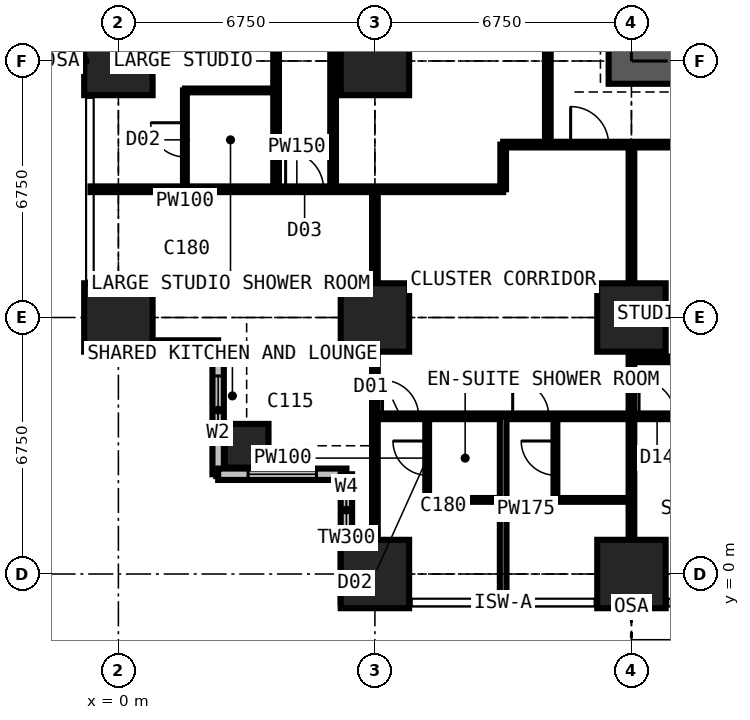
"""IFC4 building model, lengths in metres.
Left out: names, types, materials, properties, quantities, classifications, styles, units other than length and angle.
Written with IfcOpenShell. Run it as: python <this file> out.ifc"""

import sys

from ifc_helpers import new_model, si_unit, direction, frame, frame_2d, origin, origin_2d, place, context, subcontext, project, spatial, rectangle, extrude, element, fill, save


model = new_model("IFC4")
c1 = context("Model", 3, precision=1e-05, world=origin(), true_north=direction((0.0, 1.0)))
c2 = subcontext(c1, "Body", "Model", "MODEL_VIEW")
j1 = project(units=[si_unit("LENGTHUNIT", "METRE"), si_unit("PLANEANGLEUNIT", "RADIAN")], contexts=[c1])
p1 = place(None, origin())
s1 = spatial("IfcSite", under=j1, at=p1, CompositionType="ELEMENT")
p2 = place(p1, origin())
s2 = spatial("IfcBuilding", under=s1, at=p2, CompositionType="ELEMENT")
p3 = place(p2, frame((0.0, 0.0, 50.4)))
s3 = spatial("IfcBuildingStorey", under=s2, at=p3, CompositionType="ELEMENT", Elevation=50.4)
for number, where, z_axis, x_axis in (
    (1, (0.0, 6.75, 0.0), (0.0, 0.0, 1.0), (1.0, 0.0, 0.0)),
    (2, (0.0, 13.5, 0.0), (0.0, 0.0, 1.0), (1.0, 0.0, 0.0)),
):
    element("IfcColumn", number, at=place(p3, frame(where, z_axis=z_axis, x_axis=x_axis)), inside=s3, PredefinedType="COLUMN", context=c2, shape_type="SweptSolid", body=[
        extrude(rectangle(XDim=1.8, YDim=1.8, at=origin_2d()), origin(), (0.0, 0.0, 1.0), 3.6),
    ])
p4 = place(p3, frame((3.375, 3.375, 0.0), z_axis=(0.0, 0.0, 1.0), x_axis=(1.0, 0.0, 0.0)))
e3 = element("IfcColumn", 3, at=p4, inside=s3, PredefinedType="COLUMN", context=c2, shape_type="SweptSolid", body=[
    extrude(rectangle(XDim=1.15, YDim=1.15, at=origin_2d()), origin(), (0.0, 0.0, 1.0), 3.6),
])
for number, where, z_axis, x_axis in (
    (4, (6.75, 0.0, 0.0), (0.0, 0.0, 1.0), (1.0, 0.0, 0.0)),
    (5, (6.75, 6.75, 0.0), (0.0, 0.0, 1.0), (1.0, 0.0, 0.0)),
    (6, (6.75, 13.5, 0.0), (0.0, 0.0, 1.0), (1.0, 0.0, 0.0)),
    (7, (13.5, 0.0, 0.0), (0.0, 0.0, 1.0), (1.0, 0.0, 0.0)),
    (8, (13.5, 6.75, 0.0), (0.0, 0.0, 1.0), (1.0, 0.0, 0.0)),
):
    element("IfcColumn", number, at=place(p3, frame(where, z_axis=z_axis, x_axis=x_axis)), inside=s3, PredefinedType="COLUMN", context=c2, shape_type="SweptSolid", body=[
        extrude(rectangle(XDim=1.8, YDim=1.8, at=origin_2d()), origin(), (0.0, 0.0, 1.0), 3.6),
    ])
p5 = place(p3, frame((12.9, 13.5, 0.0), z_axis=(0.0, 0.0, 1.0), x_axis=(1.0, 0.0, 0.0)))
e9 = element("IfcWall", 9, at=p5, inside=s3, PredefinedType="SHEAR", context=c2, shape_type="SweptSolid", body=[
    extrude(rectangle(XDim=14.7, YDim=1.2, at=frame_2d((7.35, 0.0))), origin(), (0.0, 0.0, 1.0), 3.6),
])
p6 = place(p3, frame((-0.75, 6.0, 0.0), z_axis=(0.0, 0.0, 1.0), x_axis=(1.0, 0.0, 0.0)))
e10 = element("IfcWall", 10, at=p6, inside=s3, PredefinedType="SOLIDWALL", context=c2, shape_type="SweptSolid", body=[
    extrude(rectangle(XDim=3.375, YDim=0.3, at=frame_2d((1.688, 0.0))), origin(), (0.0, 0.0, 1.0), 3.375),
])
p7 = place(p6, frame((1.833, 0.0, 0.9)))
e11 = element("IfcOpeningElement", 11, at=p7, cuts=e10, PredefinedType="OPENING", context=c2, shape_type="SweptSolid", body=[
    extrude(rectangle(XDim=1.2, YDim=1.8, at=frame_2d((0.6, 0.9))), frame((0.0, 0.16, 0.0), z_axis=(0.0, -1.0, 0.0), x_axis=(1.0, 0.0, 0.0)), (0.0, 0.0, 1.0), 0.32),
])
p8 = place(p3, frame((2.625, 6.0, 0.0), z_axis=(0.0, 0.0, 1.0), x_axis=(0.0, -1.0, 0.0)))
e12 = element("IfcWall", 12, at=p8, inside=s3, PredefinedType="SOLIDWALL", context=c2, shape_type="SweptSolid", body=[
    extrude(rectangle(XDim=3.375, YDim=0.3, at=frame_2d((1.688, 0.0))), origin(), (0.0, 0.0, 1.0), 3.375),
])
p9 = place(p8, frame((0.788, 0.0, 0.6)))
e13 = element("IfcOpeningElement", 13, at=p9, cuts=e12, PredefinedType="OPENING", context=c2, shape_type="SweptSolid", body=[
    extrude(rectangle(XDim=1.8, YDim=2.1, at=frame_2d((0.9, 1.05))), frame((0.0, 0.16, 0.0), z_axis=(0.0, -1.0, 0.0), x_axis=(1.0, 0.0, 0.0)), (0.0, 0.0, 1.0), 0.32),
])
p10 = place(p3, frame((2.625, 2.625, 0.0), z_axis=(0.0, 0.0, 1.0), x_axis=(1.0, 0.0, 0.0)))
e14 = element("IfcWall", 14, at=p10, inside=s3, PredefinedType="SOLIDWALL", context=c2, shape_type="SweptSolid", body=[
    extrude(rectangle(XDim=3.375, YDim=0.3, at=frame_2d((1.688, 0.0))), origin(), (0.0, 0.0, 1.0), 3.375),
])
p11 = place(p10, frame((0.788, 0.0, 0.6)))
e15 = element("IfcOpeningElement", 15, at=p11, cuts=e14, PredefinedType="OPENING", context=c2, shape_type="SweptSolid", body=[
    extrude(rectangle(XDim=1.8, YDim=2.1, at=frame_2d((0.9, 1.05))), frame((0.0, 0.16, 0.0), z_axis=(0.0, -1.0, 0.0), x_axis=(1.0, 0.0, 0.0)), (0.0, 0.0, 1.0), 0.32),
])
p12 = place(p3, frame((6.0, 2.625, 0.0), z_axis=(0.0, 0.0, 1.0), x_axis=(0.0, -1.0, 0.0)))
e16 = element("IfcWall", 16, at=p12, inside=s3, PredefinedType="SOLIDWALL", context=c2, shape_type="SweptSolid", body=[
    extrude(rectangle(XDim=3.375, YDim=0.3, at=frame_2d((1.688, 0.0))), origin(), (0.0, 0.0, 1.0), 3.375),
])
p13 = place(p12, frame((0.343, 0.0, 0.9)))
e17 = element("IfcOpeningElement", 17, at=p13, cuts=e16, PredefinedType="OPENING", context=c2, shape_type="SweptSolid", body=[
    extrude(rectangle(XDim=1.2, YDim=1.8, at=frame_2d((0.6, 0.9))), frame((0.0, 0.16, 0.0), z_axis=(0.0, -1.0, 0.0), x_axis=(1.0, 0.0, 0.0)), (0.0, 0.0, 1.0), 0.32),
])
p14 = place(p3, frame((-0.734, 10.125, 0.0), z_axis=(0.0, 0.0, 1.0), x_axis=(1.0, 0.0, 0.0)))
e18 = element("IfcWall", 18, at=p14, inside=s3, PredefinedType="PARTITIONING", context=c2, shape_type="SweptSolid", body=[
    extrude(rectangle(XDim=10.859, YDim=0.15, at=frame_2d((5.429, 0.0))), origin(), (0.0, 0.0, 1.0), 3.375),
])
p15 = place(p14, frame((5.134, 0.0, 0.0)))
e19 = element("IfcOpeningElement", 19, at=p15, cuts=e18, PredefinedType="OPENING", context=c2, shape_type="SweptSolid", body=[
    extrude(rectangle(XDim=1.0, YDim=2.2, at=frame_2d((0.5, 1.1))), frame((0.0, 0.085, 0.0), z_axis=(0.0, -1.0, 0.0), x_axis=(1.0, 0.0, 0.0)), (0.0, 0.0, 1.0), 0.17),
])
p16 = place(p3, frame((1.75, 10.125, 0.0), z_axis=(0.0, 0.0, 1.0), x_axis=(0.0, 1.0, 0.0)))
e20 = element("IfcWall", 20, at=p16, inside=s3, PredefinedType="PARTITIONING", context=c2, shape_type="SweptSolid", body=[
    extrude(rectangle(XDim=2.6, YDim=0.1, at=frame_2d((1.3, 0.0))), origin(), (0.0, 0.0, 1.0), 3.375),
])
p17 = place(p16, frame((0.85, 0.0, 0.0)))
e21 = element("IfcOpeningElement", 21, at=p17, cuts=e20, PredefinedType="OPENING", context=c2, shape_type="SweptSolid", body=[
    extrude(rectangle(XDim=0.9, YDim=2.2, at=frame_2d((0.45, 1.1))), frame((0.0, 0.06, 0.0), z_axis=(0.0, -1.0, 0.0), x_axis=(1.0, 0.0, 0.0)), (0.0, 0.0, 1.0), 0.12),
])
p18 = place(p3, frame((1.75, 12.725, 0.0), z_axis=(0.0, 0.0, 1.0), x_axis=(1.0, 0.0, 0.0)))
e22 = element("IfcWall", 22, at=p18, inside=s3, PredefinedType="PARTITIONING", context=c2, shape_type="SweptSolid", body=[
    extrude(rectangle(XDim=2.4, YDim=0.1, at=frame_2d((1.2, 0.0))), origin(), (0.0, 0.0, 1.0), 3.375),
])
p19 = place(p3, frame((4.15, 10.125, 0.0), z_axis=(0.0, 0.0, 1.0), x_axis=(0.0, 1.0, 0.0)))
e23 = element("IfcWall", 23, at=p19, inside=s3, PredefinedType="PARTITIONING", context=c2, shape_type="SweptSolid", body=[
    extrude(rectangle(XDim=23.625, YDim=0.15, at=frame_2d((11.812, 0.0))), origin(), (0.0, 0.0, 1.0), 3.375),
])
p20 = place(p19, frame((4.2, 0.0, 0.0)))
e24 = element("IfcOpeningElement", 24, at=p20, cuts=e23, PredefinedType="OPENING", context=c2, shape_type="SweptSolid", body=[
    extrude(rectangle(XDim=0.95, YDim=2.2, at=frame_2d((0.475, 1.1))), frame((0.0, 0.085, 0.0), z_axis=(0.0, -1.0, 0.0), x_axis=(1.0, 0.0, 0.0)), (0.0, 0.0, 1.0), 0.17),
])
p21 = place(p19, frame((10.95, 0.0, 0.0)))
e25 = element("IfcOpeningElement", 25, at=p21, cuts=e23, PredefinedType="OPENING", context=c2, shape_type="SweptSolid", body=[
    extrude(rectangle(XDim=0.95, YDim=2.2, at=frame_2d((0.475, 1.1))), frame((0.0, 0.085, 0.0), z_axis=(0.0, -1.0, 0.0), x_axis=(1.0, 0.0, 0.0)), (0.0, 0.0, 1.0), 0.17),
])
p22 = place(p19, frame((17.7, 0.0, 0.0)))
e26 = element("IfcOpeningElement", 26, at=p22, cuts=e23, PredefinedType="OPENING", context=c2, shape_type="SweptSolid", body=[
    extrude(rectangle(XDim=0.95, YDim=2.2, at=frame_2d((0.475, 1.1))), frame((0.0, 0.085, 0.0), z_axis=(0.0, -1.0, 0.0), x_axis=(1.0, 0.0, 0.0)), (0.0, 0.0, 1.0), 0.17),
])
p23 = place(p19, frame((20.5, 0.0, 0.0)))
e27 = element("IfcOpeningElement", 27, at=p23, cuts=e23, PredefinedType="OPENING", context=c2, shape_type="SweptSolid", body=[
    extrude(rectangle(XDim=0.95, YDim=2.2, at=frame_2d((0.475, 1.1))), frame((0.0, 0.085, 0.0), z_axis=(0.0, -1.0, 0.0), x_axis=(1.0, 0.0, 0.0)), (0.0, 0.0, 1.0), 0.17),
])
p24 = place(p3, frame((5.65, 10.125, 0.0), z_axis=(0.0, 0.0, 1.0), x_axis=(0.0, 1.0, 0.0)))
e28 = element("IfcWall", 28, at=p24, inside=s3, PredefinedType="PARTITIONING", context=c2, shape_type="SweptSolid", body=[
    extrude(rectangle(XDim=10.762, YDim=0.15, at=frame_2d((5.381, 0.0))), origin(), (0.0, 0.0, 1.0), 3.375),
])
p25 = place(p24, frame((4.9, 0.0, 0.0)))
e29 = element("IfcOpeningElement", 29, at=p25, cuts=e28, PredefinedType="OPENING", context=c2, shape_type="SweptSolid", body=[
    extrude(rectangle(XDim=0.95, YDim=2.2, at=frame_2d((0.475, 1.1))), frame((0.0, 0.085, 0.0), z_axis=(0.0, -1.0, 0.0), x_axis=(1.0, 0.0, 0.0)), (0.0, 0.0, 1.0), 0.17),
])
p26 = place(p3, frame((6.75, -0.734, 0.0), z_axis=(0.0, 0.0, 1.0), x_axis=(0.0, 1.0, 0.0)))
e30 = element("IfcWall", 30, at=p26, inside=s3, PredefinedType="PARTITIONING", context=c2, shape_type="SweptSolid", body=[
    extrude(rectangle(XDim=10.859, YDim=0.15, at=frame_2d((5.429, 0.0))), origin(), (0.0, 0.0, 1.0), 2.877),
])
p27 = place(p3, frame((6.75, 4.15, 0.0), z_axis=(0.0, 0.0, 1.0), x_axis=(1.0, 0.0, 0.0)))
e31 = element("IfcWall", 31, at=p27, inside=s3, PredefinedType="PARTITIONING", context=c2, shape_type="SweptSolid", body=[
    extrude(rectangle(XDim=23.625, YDim=0.15, at=frame_2d((11.812, 0.0))), origin(), (0.0, 0.0, 1.0), 3.375),
])
p28 = place(p27, frame((0.2, 0.0, 0.0)))
e32 = element("IfcOpeningElement", 32, at=p28, cuts=e31, PredefinedType="OPENING", context=c2, shape_type="SweptSolid", body=[
    extrude(rectangle(XDim=0.95, YDim=2.2, at=frame_2d((0.475, 1.1))), frame((0.0, 0.085, 0.0), z_axis=(0.0, -1.0, 0.0), x_axis=(1.0, 0.0, 0.0)), (0.0, 0.0, 1.0), 0.17),
])
p29 = place(p27, frame((3.625, 0.0, 0.0)))
e33 = element("IfcOpeningElement", 33, at=p29, cuts=e31, PredefinedType="OPENING", context=c2, shape_type="SweptSolid", body=[
    extrude(rectangle(XDim=0.95, YDim=2.2, at=frame_2d((0.475, 1.1))), frame((0.0, 0.085, 0.0), z_axis=(0.0, -1.0, 0.0), x_axis=(1.0, 0.0, 0.0)), (0.0, 0.0, 1.0), 0.17),
])
p30 = place(p27, frame((18.475, 0.0, 0.0)))
e34 = element("IfcOpeningElement", 34, at=p30, cuts=e31, PredefinedType="OPENING", context=c2, shape_type="SweptSolid", body=[
    extrude(rectangle(XDim=0.95, YDim=2.2, at=frame_2d((0.475, 1.1))), frame((0.0, 0.085, 0.0), z_axis=(0.0, -1.0, 0.0), x_axis=(1.0, 0.0, 0.0)), (0.0, 0.0, 1.0), 0.17),
])
p31 = place(p27, frame((11.725, 0.0, 0.0)))
e35 = element("IfcOpeningElement", 35, at=p31, cuts=e31, PredefinedType="OPENING", context=c2, shape_type="SweptSolid", body=[
    extrude(rectangle(XDim=0.95, YDim=2.2, at=frame_2d((0.475, 1.1))), frame((0.0, 0.085, 0.0), z_axis=(0.0, -1.0, 0.0), x_axis=(1.0, 0.0, 0.0)), (0.0, 0.0, 1.0), 0.17),
])
p32 = place(p27, frame((6.95, 0.0, 0.0)))
e36 = element("IfcOpeningElement", 36, at=p32, cuts=e31, PredefinedType="OPENING", context=c2, shape_type="SweptSolid", body=[
    extrude(rectangle(XDim=0.95, YDim=2.2, at=frame_2d((0.475, 1.1))), frame((0.0, 0.085, 0.0), z_axis=(0.0, -1.0, 0.0), x_axis=(1.0, 0.0, 0.0)), (0.0, 0.0, 1.0), 0.17),
])
p33 = place(p3, frame((8.125, 1.95, 0.0), z_axis=(0.0, 0.0, 1.0), x_axis=(0.0, 1.0, 0.0)))
e37 = element("IfcWall", 37, at=p33, inside=s3, PredefinedType="PARTITIONING", context=c2, shape_type="SweptSolid", body=[
    extrude(rectangle(XDim=2.2, YDim=0.1, at=frame_2d((1.1, 0.0))), origin(), (0.0, 0.0, 1.0), 3.375),
])
p34 = place(p33, frame((0.65, 0.0, 0.0)))
e38 = element("IfcOpeningElement", 38, at=p34, cuts=e37, PredefinedType="OPENING", context=c2, shape_type="SweptSolid", body=[
    extrude(rectangle(XDim=0.9, YDim=2.2, at=frame_2d((0.45, 1.1))), frame((0.0, 0.06, 0.0), z_axis=(0.0, -1.0, 0.0), x_axis=(1.0, 0.0, 0.0)), (0.0, 0.0, 1.0), 0.12),
])
p35 = place(p3, frame((8.125, 1.95, 0.0), z_axis=(0.0, 0.0, 1.0), x_axis=(1.0, 0.0, 0.0)))
e39 = element("IfcWall", 39, at=p35, inside=s3, PredefinedType="PARTITIONING", context=c2, shape_type="SweptSolid", body=[
    extrude(rectangle(XDim=2.0, YDim=0.1, at=frame_2d((1.0, 0.0))), origin(), (0.0, 0.0, 1.0), 3.375),
])
p36 = place(p3, frame((10.125, -0.734, 0.0), z_axis=(0.0, 0.0, 1.0), x_axis=(0.0, 1.0, 0.0)))
e40 = element("IfcWall", 40, at=p36, inside=s3, PredefinedType="PARTITIONING", context=c2, shape_type="SweptSolid", body=[
    extrude(rectangle(XDim=4.884, YDim=0.175, at=frame_2d((2.442, 0.0))), origin(), (0.0, 0.0, 1.0), 3.375),
])
p37 = place(p3, frame((10.125, 10.125, 0.0), z_axis=(0.0, 0.0, 1.0), x_axis=(0.0, 1.0, 0.0)))
e41 = element("IfcWall", 41, at=p37, inside=s3, PredefinedType="PARTITIONING", context=c2, shape_type="SweptSolid", body=[
    extrude(rectangle(XDim=1.175, YDim=0.15, at=frame_2d((0.587, 0.0))), origin(), (0.0, 0.0, 1.0), 3.375),
])
p38 = place(p3, frame((10.125, 11.3, 0.0), z_axis=(0.0, 0.0, 1.0), x_axis=(1.0, 0.0, 0.0)))
e42 = element("IfcWall", 42, at=p38, inside=s3, PredefinedType="PARTITIONING", context=c2, shape_type="SweptSolid", body=[
    extrude(rectangle(XDim=20.675, YDim=0.15, at=frame_2d((10.337, 0.0))), origin(), (0.0, 0.0, 1.0), 3.375),
])
p39 = place(p38, frame((1.775, 0.0, 0.0)))
e43 = element("IfcOpeningElement", 43, at=p39, cuts=e42, PredefinedType="OPENING", context=c2, shape_type="SweptSolid", body=[
    extrude(rectangle(XDim=1.0, YDim=2.2, at=frame_2d((0.5, 1.1))), frame((0.0, 0.085, 0.0), z_axis=(0.0, -1.0, 0.0), x_axis=(1.0, 0.0, 0.0)), (0.0, 0.0, 1.0), 0.17),
])
p40 = place(p38, frame((11.312, 0.0, 0.0)))
e44 = element("IfcOpeningElement", 44, at=p40, cuts=e42, PredefinedType="OPENING", context=c2, shape_type="SweptSolid", body=[
    extrude(rectangle(XDim=1.0, YDim=2.2, at=frame_2d((0.5, 1.1))), frame((0.0, 0.085, 0.0), z_axis=(0.0, -1.0, 0.0), x_axis=(1.0, 0.0, 0.0)), (0.0, 0.0, 1.0), 0.17),
])
p41 = place(p3, frame((11.3, 11.3, 0.0), z_axis=(0.0, 0.0, 1.0), x_axis=(0.0, 1.0, 0.0)))
e45 = element("IfcWall", 45, at=p41, inside=s3, PredefinedType="PARTITIONING", context=c2, shape_type="SweptSolid", body=[
    extrude(rectangle(XDim=19.075, YDim=0.15, at=frame_2d((9.538, 0.0))), origin(), (0.0, 0.0, 1.0), 3.375),
])
p42 = place(p41, frame((10.137, 0.0, 0.0)))
e46 = element("IfcOpeningElement", 46, at=p42, cuts=e45, PredefinedType="OPENING", context=c2, shape_type="SweptSolid", body=[
    extrude(rectangle(XDim=1.0, YDim=2.2, at=frame_2d((0.5, 1.1))), frame((0.0, 0.085, 0.0), z_axis=(0.0, -1.0, 0.0), x_axis=(1.0, 0.0, 0.0)), (0.0, 0.0, 1.0), 0.17),
])
p43 = place(p3, frame((11.5, 1.95, 0.0), z_axis=(0.0, 0.0, 1.0), x_axis=(0.0, 1.0, 0.0)))
e47 = element("IfcWall", 47, at=p43, inside=s3, PredefinedType="PARTITIONING", context=c2, shape_type="SweptSolid", body=[
    extrude(rectangle(XDim=2.2, YDim=0.1, at=frame_2d((1.1, 0.0))), origin(), (0.0, 0.0, 1.0), 3.375),
])
p44 = place(p43, frame((0.65, 0.0, 0.0)))
e48 = element("IfcOpeningElement", 48, at=p44, cuts=e47, PredefinedType="OPENING", context=c2, shape_type="SweptSolid", body=[
    extrude(rectangle(XDim=0.9, YDim=2.2, at=frame_2d((0.45, 1.1))), frame((0.0, 0.06, 0.0), z_axis=(0.0, -1.0, 0.0), x_axis=(1.0, 0.0, 0.0)), (0.0, 0.0, 1.0), 0.12),
])
p45 = place(p3, frame((11.5, 1.95, 0.0), z_axis=(0.0, 0.0, 1.0), x_axis=(1.0, 0.0, 0.0)))
e49 = element("IfcWall", 49, at=p45, inside=s3, PredefinedType="PARTITIONING", context=c2, shape_type="SweptSolid", body=[
    extrude(rectangle(XDim=2.0, YDim=0.1, at=frame_2d((1.0, 0.0))), origin(), (0.0, 0.0, 1.0), 3.375),
])
p46 = place(p3, frame((13.5, -0.734, 0.0), z_axis=(0.0, 0.0, 1.0), x_axis=(0.0, 1.0, 0.0)))
e50 = element("IfcWall", 50, at=p46, inside=s3, PredefinedType="PARTITIONING", context=c2, shape_type="SweptSolid", body=[
    extrude(rectangle(XDim=12.034, YDim=0.15, at=frame_2d((6.017, 0.0))), origin(), (0.0, 0.0, 1.0), 2.61),
])
p47 = place(p3, frame((13.5, 5.65, 0.0), z_axis=(0.0, 0.0, 1.0), x_axis=(1.0, 0.0, 0.0)))
e51 = element("IfcWall", 51, at=p47, inside=s3, PredefinedType="PARTITIONING", context=c2, shape_type="SweptSolid", body=[
    extrude(rectangle(XDim=7.387, YDim=0.15, at=frame_2d((3.694, 0.0))), origin(), (0.0, 0.0, 1.0), 3.375),
])
p48 = place(p47, frame((3.2, 0.0, 0.0)))
e52 = element("IfcOpeningElement", 52, at=p48, cuts=e51, PredefinedType="OPENING", context=c2, shape_type="SweptSolid", body=[
    extrude(rectangle(XDim=0.95, YDim=2.2, at=frame_2d((0.475, 1.1))), frame((0.0, 0.085, 0.0), z_axis=(0.0, -1.0, 0.0), x_axis=(1.0, 0.0, 0.0)), (0.0, 0.0, 1.0), 0.17),
])
p49 = place(p7, origin())
e53 = element("IfcWindow", 53, at=p49, inside=s3, PartitioningType="SINGLE_PANEL", PredefinedType="WINDOW", context=c2, shape_type="SweptSolid", body=[
    extrude(rectangle(XDim=1.2, YDim=1.8, at=frame_2d((0.6, 0.9))), frame((0.0, 0.03, 0.0), z_axis=(0.0, -1.0, 0.0), x_axis=(1.0, 0.0, 0.0)), (0.0, 0.0, 1.0), 0.06),
])
fill(e11, e53)
p50 = place(p9, origin())
e54 = element("IfcWindow", 54, at=p50, inside=s3, PartitioningType="SINGLE_PANEL", PredefinedType="WINDOW", context=c2, shape_type="SweptSolid", body=[
    extrude(rectangle(XDim=1.8, YDim=2.1, at=frame_2d((0.9, 1.05))), frame((0.0, 0.03, 0.0), z_axis=(0.0, -1.0, 0.0), x_axis=(1.0, 0.0, 0.0)), (0.0, 0.0, 1.0), 0.06),
])
fill(e13, e54)
p51 = place(p11, origin())
e55 = element("IfcWindow", 55, at=p51, inside=s3, PartitioningType="SINGLE_PANEL", PredefinedType="WINDOW", context=c2, shape_type="SweptSolid", body=[
    extrude(rectangle(XDim=1.8, YDim=2.1, at=frame_2d((0.9, 1.05))), frame((0.0, 0.03, 0.0), z_axis=(0.0, -1.0, 0.0), x_axis=(1.0, 0.0, 0.0)), (0.0, 0.0, 1.0), 0.06),
])
fill(e15, e55)
p52 = place(p13, origin())
e56 = element("IfcWindow", 56, at=p52, inside=s3, PartitioningType="SINGLE_PANEL", PredefinedType="WINDOW", context=c2, shape_type="SweptSolid", body=[
    extrude(rectangle(XDim=1.2, YDim=1.8, at=frame_2d((0.6, 0.9))), frame((0.0, 0.03, 0.0), z_axis=(0.0, -1.0, 0.0), x_axis=(1.0, 0.0, 0.0)), (0.0, 0.0, 1.0), 0.06),
])
fill(e17, e56)
p53 = place(p15, origin())
e57 = element("IfcDoor", 57, at=p53, inside=s3, OperationType="SINGLE_SWING_LEFT", PredefinedType="DOOR", context=c2, shape_type="SweptSolid", body=[
    extrude(rectangle(XDim=1.0, YDim=2.2, at=frame_2d((0.5, 1.1))), frame((0.0, 0.025, 0.0), z_axis=(0.0, -1.0, 0.0), x_axis=(1.0, 0.0, 0.0)), (0.0, 0.0, 1.0), 0.05),
])
fill(e19, e57)
p54 = place(p28, origin())
e58 = element("IfcDoor", 58, at=p54, inside=s3, OperationType="SINGLE_SWING_LEFT", PredefinedType="DOOR", context=c2, shape_type="SweptSolid", body=[
    extrude(rectangle(XDim=0.95, YDim=2.2, at=frame_2d((0.475, 1.1))), frame((0.0, 0.025, 0.0), z_axis=(0.0, -1.0, 0.0), x_axis=(1.0, 0.0, 0.0)), (0.0, 0.0, 1.0), 0.05),
])
fill(e32, e58)
p55 = place(p34, origin())
e59 = element("IfcDoor", 59, at=p55, inside=s3, OperationType="SINGLE_SWING_RIGHT", PredefinedType="DOOR", context=c2, shape_type="SweptSolid", body=[
    extrude(rectangle(XDim=0.9, YDim=2.2, at=frame_2d((0.45, 1.1))), frame((0.0, 0.025, 0.0), z_axis=(0.0, -1.0, 0.0), x_axis=(1.0, 0.0, 0.0)), (0.0, 0.0, 1.0), 0.05),
])
fill(e38, e59)
p56 = place(p29, origin())
e60 = element("IfcDoor", 60, at=p56, inside=s3, OperationType="SINGLE_SWING_LEFT", PredefinedType="DOOR", context=c2, shape_type="SweptSolid", body=[
    extrude(rectangle(XDim=0.95, YDim=2.2, at=frame_2d((0.475, 1.1))), frame((0.0, 0.025, 0.0), z_axis=(0.0, -1.0, 0.0), x_axis=(1.0, 0.0, 0.0)), (0.0, 0.0, 1.0), 0.05),
])
fill(e33, e60)
p57 = place(p44, origin())
e61 = element("IfcDoor", 61, at=p57, inside=s3, OperationType="SINGLE_SWING_RIGHT", PredefinedType="DOOR", context=c2, shape_type="SweptSolid", body=[
    extrude(rectangle(XDim=0.9, YDim=2.2, at=frame_2d((0.45, 1.1))), frame((0.0, 0.025, 0.0), z_axis=(0.0, -1.0, 0.0), x_axis=(1.0, 0.0, 0.0)), (0.0, 0.0, 1.0), 0.05),
])
fill(e48, e61)
p58 = place(p39, origin())
e62 = element("IfcDoor", 62, at=p58, inside=s3, OperationType="SINGLE_SWING_LEFT", PredefinedType="DOOR", context=c2, shape_type="SweptSolid", body=[
    extrude(rectangle(XDim=1.0, YDim=2.2, at=frame_2d((0.5, 1.1))), frame((0.0, 0.025, 0.0), z_axis=(0.0, -1.0, 0.0), x_axis=(1.0, 0.0, 0.0)), (0.0, 0.0, 1.0), 0.05),
])
fill(e43, e62)
p59 = place(p32, origin())
e63 = element("IfcDoor", 63, at=p59, inside=s3, OperationType="SINGLE_SWING_LEFT", PredefinedType="DOOR", context=c2, shape_type="SweptSolid", body=[
    extrude(rectangle(XDim=0.95, YDim=2.2, at=frame_2d((0.475, 1.1))), frame((0.0, 0.025, 0.0), z_axis=(0.0, -1.0, 0.0), x_axis=(1.0, 0.0, 0.0)), (0.0, 0.0, 1.0), 0.05),
])
fill(e36, e63)
p60 = place(p17, origin())
e64 = element("IfcDoor", 64, at=p60, inside=s3, OperationType="SINGLE_SWING_RIGHT", PredefinedType="DOOR", context=c2, shape_type="SweptSolid", body=[
    extrude(rectangle(XDim=0.9, YDim=2.2, at=frame_2d((0.45, 1.1))), frame((0.0, 0.025, 0.0), z_axis=(0.0, -1.0, 0.0), x_axis=(1.0, 0.0, 0.0)), (0.0, 0.0, 1.0), 0.05),
])
fill(e21, e64)
save(model, sys.argv[1])
